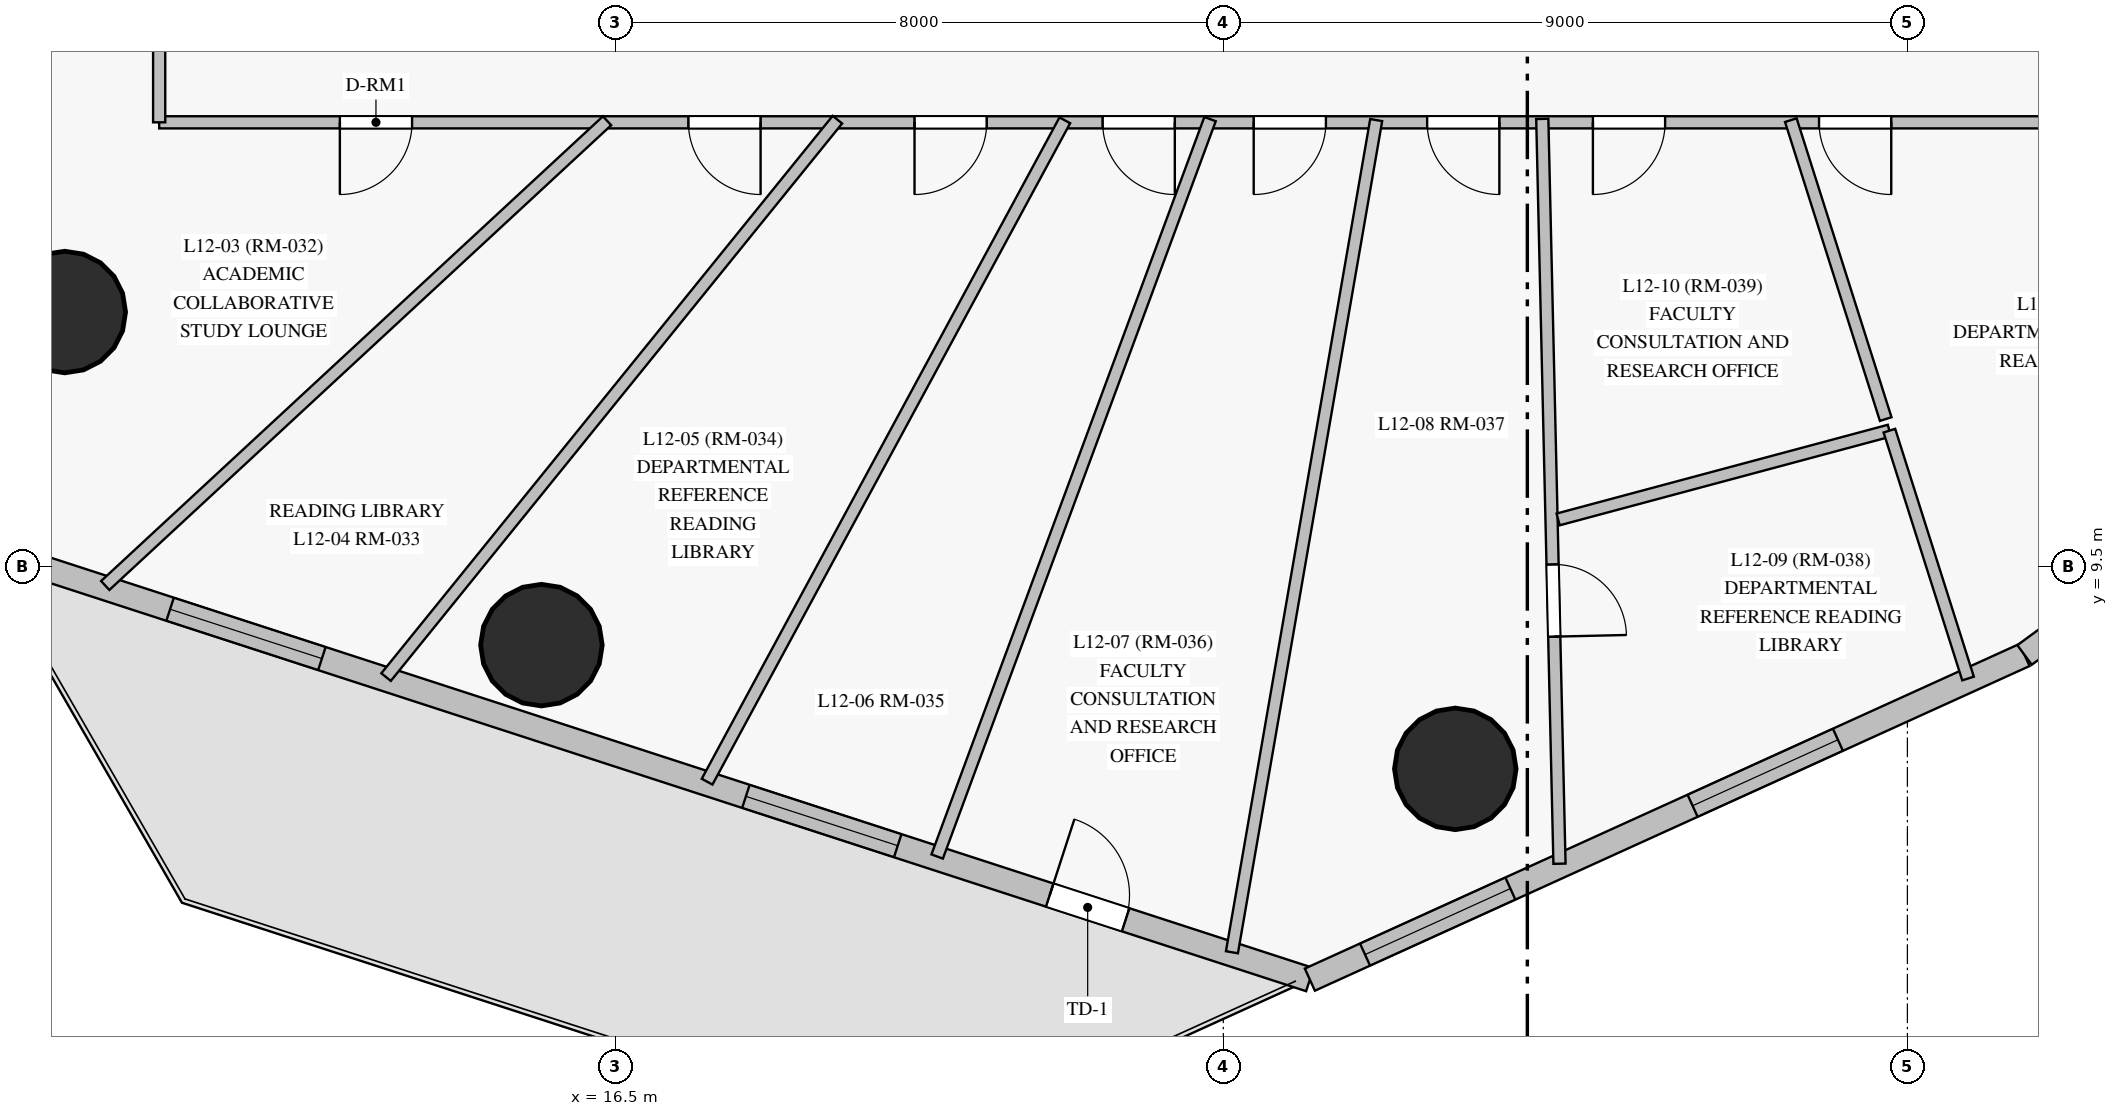
"""IFC4 building model, lengths in metres.
Left out: names, types, materials, properties, quantities, classifications, styles, units other than length and angle.
Written with IfcOpenShell. Run it as: python <this file> out.ifc"""

import sys

from ifc_helpers import new_model, si_unit, direction, frame, frame_2d, origin, origin_with_axes, origin_2d, place, context, subcontext, project, spatial, rectangle, circle, extrude, source, transform, mapped, element, fill, save


model = new_model("IFC4")
c1 = context("Model", 3, precision=1e-05, world=origin(), true_north=direction((0.0, 1.0)))
c2 = subcontext(c1, "Body", "Model", "MODEL_VIEW")
j1 = project(units=[si_unit("LENGTHUNIT", "METRE"), si_unit("PLANEANGLEUNIT", "RADIAN")], contexts=[c1])
p1 = place(None, origin())
s1 = spatial("IfcSite", under=j1, at=p1, CompositionType="ELEMENT")
p2 = place(p1, origin())
s2 = spatial("IfcBuilding", under=s1, at=p2, CompositionType="ELEMENT")
p3 = place(p2, frame((0.0, 0.0, 48.1)))
s3 = spatial("IfcBuildingStorey", under=s2, at=p3, CompositionType="ELEMENT", Elevation=48.1)
m1 = source(origin_with_axes(), c2, "Body", "SweptSolid", [
    extrude(circle(Radius=0.8, at=origin_2d()), origin(), (0.0, 0.0, 1.0), 3.6),
])
for number, where, z_axis, x_axis in (
    (1, (9.258, 12.854, 0.0), (0.0, 0.0, 1.0), (1.0, 0.0, 0.0)),
    (2, (15.529, 8.472, 0.0), (0.0, 0.0, 1.0), (1.0, 0.0, 0.0)),
    (3, (27.552, 6.844, 0.0), (0.0, 0.0, 1.0), (1.0, 0.0, 0.0)),
):
    element("IfcColumn", number, at=place(p3, frame(where, z_axis=z_axis, x_axis=x_axis)), inside=s3, PredefinedType="COLUMN", context=c2, shape_type="MappedRepresentation", body=[
        mapped(m1, transform((0.0, 0.0, 0.0), scale=1.0)),
    ])
p4 = place(p3, frame((8.1, 9.771, 0.0), z_axis=(0.0, 0.0, 1.0), x_axis=(0.951043115776, -0.30905823389, 0.0)))
e4 = element("IfcWall", 4, at=p4, inside=s3, PredefinedType="SOLIDWALL", context=c2, shape_type="SweptSolid", body=[
    extrude(rectangle(XDim=18.442, YDim=0.32, at=frame_2d((9.221, 0.0))), origin(), (0.0, 0.0, 1.0), 3.35),
])
p5 = place(p4, frame((2.675, 0.0, 0.85)))
e5 = element("IfcOpeningElement", 5, at=p5, cuts=e4, PredefinedType="OPENING", context=c2, shape_type="SweptSolid", body=[
    extrude(rectangle(XDim=2.1, YDim=1.95, at=frame_2d((1.05, 0.975))), frame((0.0, 0.17, 0.0), z_axis=(0.0, -1.0, 0.0), x_axis=(1.0, 0.0, 0.0)), (0.0, 0.0, 1.0), 0.34),
])
p6 = place(p4, frame((10.64, 0.0, 0.85)))
e6 = element("IfcOpeningElement", 6, at=p6, cuts=e4, PredefinedType="OPENING", context=c2, shape_type="SweptSolid", body=[
    extrude(rectangle(XDim=2.1, YDim=1.95, at=frame_2d((1.05, 0.975))), frame((0.0, 0.17, 0.0), z_axis=(0.0, -1.0, 0.0), x_axis=(1.0, 0.0, 0.0)), (0.0, 0.0, 1.0), 0.34),
])
p7 = place(p4, frame((14.843, 0.0, 0.0)))
e7 = element("IfcOpeningElement", 7, at=p7, cuts=e4, PredefinedType="OPENING", context=c2, shape_type="SweptSolid", body=[
    extrude(rectangle(XDim=1.05, YDim=2.12, at=frame_2d((0.525, 1.06))), frame((0.0, 0.17, 0.0), z_axis=(0.0, -1.0, 0.0), x_axis=(1.0, 0.0, 0.0)), (0.0, 0.0, 1.0), 0.34),
])
p8 = place(p3, frame((25.639, 4.071, 0.0), z_axis=(0.0, 0.0, 1.0), x_axis=(0.910463604795, 0.413589197567, 0.0)))
e8 = element("IfcWall", 8, at=p8, inside=s3, PredefinedType="SOLIDWALL", context=c2, shape_type="SweptSolid", body=[
    extrude(rectangle(XDim=10.327, YDim=0.32, at=frame_2d((5.164, 0.0))), origin(), (0.0, 0.0, 1.0), 3.35),
])
p9 = place(p8, frame((0.797, 0.0, 0.85)))
e9 = element("IfcOpeningElement", 9, at=p9, cuts=e8, PredefinedType="OPENING", context=c2, shape_type="SweptSolid", body=[
    extrude(rectangle(XDim=2.1, YDim=1.95, at=frame_2d((1.05, 0.975))), frame((0.0, 0.17, 0.0), z_axis=(0.0, -1.0, 0.0), x_axis=(1.0, 0.0, 0.0)), (0.0, 0.0, 1.0), 0.34),
])
p10 = place(p8, frame((5.531, 0.0, 0.85)))
e10 = element("IfcOpeningElement", 10, at=p10, cuts=e8, PredefinedType="OPENING", context=c2, shape_type="SweptSolid", body=[
    extrude(rectangle(XDim=2.1, YDim=1.95, at=frame_2d((1.05, 0.975))), frame((0.0, 0.17, 0.0), z_axis=(0.0, -1.0, 0.0), x_axis=(1.0, 0.0, 0.0)), (0.0, 0.0, 1.0), 0.34),
])
p11 = place(p3, frame((35.042, 8.343, 0.0), z_axis=(0.0, 0.0, 1.0), x_axis=(0.806545755589, 0.591171670618, 0.0)))
e11 = element("IfcWall", 11, at=p11, inside=s3, PredefinedType="SOLIDWALL", context=c2, shape_type="SweptSolid", body=[
    extrude(rectangle(XDim=10.916, YDim=0.32, at=frame_2d((5.458, 0.0))), origin(), (0.0, 0.0, 1.0), 3.35),
])
p12 = place(p11, frame((1.869, 0.0, 0.85)))
e12 = element("IfcOpeningElement", 12, at=p12, cuts=e11, PredefinedType="OPENING", context=c2, shape_type="SweptSolid", body=[
    extrude(rectangle(XDim=2.1, YDim=1.95, at=frame_2d((1.05, 0.975))), frame((0.0, 0.17, 0.0), z_axis=(0.0, -1.0, 0.0), x_axis=(1.0, 0.0, 0.0)), (0.0, 0.0, 1.0), 0.34),
])
p13 = place(p11, frame((6.947, 0.0, 0.85)))
e13 = element("IfcOpeningElement", 13, at=p13, cuts=e11, PredefinedType="OPENING", context=c2, shape_type="SweptSolid", body=[
    extrude(rectangle(XDim=2.1, YDim=1.95, at=frame_2d((1.05, 0.975))), frame((0.0, 0.17, 0.0), z_axis=(0.0, -1.0, 0.0), x_axis=(1.0, 0.0, 0.0)), (0.0, 0.0, 1.0), 0.34),
])
p14 = place(p3, frame((40.25, 15.35, 0.0), z_axis=(0.0, 0.0, 1.0), x_axis=(-1.0, 0.0, 0.0)))
e14 = element("IfcWall", 14, at=p14, inside=s3, PredefinedType="PARTITIONING", context=c2, shape_type="SweptSolid", body=[
    extrude(rectangle(XDim=29.75, YDim=0.16, at=frame_2d((14.875, 0.0))), origin(), (0.0, 0.0, 1.0), 2.7),
])
p15 = place(p14, frame((26.423, 0.0, 0.0)))
e15 = element("IfcOpeningElement", 15, at=p15, cuts=e14, PredefinedType="OPENING", context=c2, shape_type="SweptSolid", body=[
    extrude(rectangle(XDim=0.95, YDim=2.15, at=frame_2d((0.475, 1.075))), frame((0.0, 0.09, 0.0), z_axis=(0.0, -1.0, 0.0), x_axis=(1.0, 0.0, 0.0)), (0.0, 0.0, 1.0), 0.18),
])
p16 = place(p14, frame((21.837, 0.0, 0.0)))
e16 = element("IfcOpeningElement", 16, at=p16, cuts=e14, PredefinedType="OPENING", context=c2, shape_type="SweptSolid", body=[
    extrude(rectangle(XDim=0.95, YDim=2.15, at=frame_2d((0.475, 1.075))), frame((0.0, 0.09, 0.0), z_axis=(0.0, -1.0, 0.0), x_axis=(1.0, 0.0, 0.0)), (0.0, 0.0, 1.0), 0.18),
])
p17 = place(p14, frame((18.863, 0.0, 0.0)))
e17 = element("IfcOpeningElement", 17, at=p17, cuts=e14, PredefinedType="OPENING", context=c2, shape_type="SweptSolid", body=[
    extrude(rectangle(XDim=0.95, YDim=2.15, at=frame_2d((0.475, 1.075))), frame((0.0, 0.09, 0.0), z_axis=(0.0, -1.0, 0.0), x_axis=(1.0, 0.0, 0.0)), (0.0, 0.0, 1.0), 0.18),
])
p18 = place(p14, frame((16.388, 0.0, 0.0)))
e18 = element("IfcOpeningElement", 18, at=p18, cuts=e14, PredefinedType="OPENING", context=c2, shape_type="SweptSolid", body=[
    extrude(rectangle(XDim=0.95, YDim=2.15, at=frame_2d((0.475, 1.075))), frame((0.0, 0.09, 0.0), z_axis=(0.0, -1.0, 0.0), x_axis=(1.0, 0.0, 0.0)), (0.0, 0.0, 1.0), 0.18),
])
p19 = place(p14, frame((14.4, 0.0, 0.0)))
e19 = element("IfcOpeningElement", 19, at=p19, cuts=e14, PredefinedType="OPENING", context=c2, shape_type="SweptSolid", body=[
    extrude(rectangle(XDim=0.95, YDim=2.15, at=frame_2d((0.475, 1.075))), frame((0.0, 0.09, 0.0), z_axis=(0.0, -1.0, 0.0), x_axis=(1.0, 0.0, 0.0)), (0.0, 0.0, 1.0), 0.18),
])
p20 = place(p14, frame((12.118, 0.0, 0.0)))
e20 = element("IfcOpeningElement", 20, at=p20, cuts=e14, PredefinedType="OPENING", context=c2, shape_type="SweptSolid", body=[
    extrude(rectangle(XDim=0.95, YDim=2.15, at=frame_2d((0.475, 1.075))), frame((0.0, 0.09, 0.0), z_axis=(0.0, -1.0, 0.0), x_axis=(1.0, 0.0, 0.0)), (0.0, 0.0, 1.0), 0.18),
])
p21 = place(p14, frame((9.938, 0.0, 0.0)))
e21 = element("IfcOpeningElement", 21, at=p21, cuts=e14, PredefinedType="OPENING", context=c2, shape_type="SweptSolid", body=[
    extrude(rectangle(XDim=0.95, YDim=2.15, at=frame_2d((0.475, 1.075))), frame((0.0, 0.09, 0.0), z_axis=(0.0, -1.0, 0.0), x_axis=(1.0, 0.0, 0.0)), (0.0, 0.0, 1.0), 0.18),
])
p22 = place(p14, frame((6.962, 0.0, 0.0)))
e22 = element("IfcOpeningElement", 22, at=p22, cuts=e14, PredefinedType="OPENING", context=c2, shape_type="SweptSolid", body=[
    extrude(rectangle(XDim=0.95, YDim=2.15, at=frame_2d((0.475, 1.075))), frame((0.0, 0.09, 0.0), z_axis=(0.0, -1.0, 0.0), x_axis=(1.0, 0.0, 0.0)), (0.0, 0.0, 1.0), 0.18),
])
p23 = place(p3, frame((10.5, 15.35, 0.0), z_axis=(0.0, 0.0, 1.0), x_axis=(0.0, 1.0, 0.0)))
e23 = element("IfcWall", 23, at=p23, inside=s3, PredefinedType="PARTITIONING", context=c2, shape_type="SweptSolid", body=[
    extrude(rectangle(XDim=22.3, YDim=0.16, at=frame_2d((11.15, 0.0))), origin(), (0.0, 0.0, 1.0), 2.75),
])
p24 = place(p23, frame((7.33, 0.0, 0.0)))
e24 = element("IfcOpeningElement", 24, at=p24, cuts=e23, PredefinedType="OPENING", context=c2, shape_type="SweptSolid", body=[
    extrude(rectangle(XDim=0.95, YDim=2.15, at=frame_2d((0.475, 1.075))), frame((0.0, 0.09, 0.0), z_axis=(0.0, -1.0, 0.0), x_axis=(1.0, 0.0, 0.0)), (0.0, 0.0, 1.0), 0.18),
])
p25 = place(p23, frame((2.893, 0.0, 0.0)))
e25 = element("IfcOpeningElement", 25, at=p25, cuts=e23, PredefinedType="OPENING", context=c2, shape_type="SweptSolid", body=[
    extrude(rectangle(XDim=0.96, YDim=2.15, at=frame_2d((0.48, 1.075))), frame((0.0, 0.09, 0.0), z_axis=(0.0, -1.0, 0.0), x_axis=(1.0, 0.0, 0.0)), (0.0, 0.0, 1.0), 0.18),
])
p26 = place(p23, frame((16.25, 0.0, 0.0)))
e26 = element("IfcOpeningElement", 26, at=p26, cuts=e23, PredefinedType="OPENING", context=c2, shape_type="SweptSolid", body=[
    extrude(rectangle(XDim=0.95, YDim=2.15, at=frame_2d((0.475, 1.075))), frame((0.0, 0.09, 0.0), z_axis=(0.0, -1.0, 0.0), x_axis=(1.0, 0.0, 0.0)), (0.0, 0.0, 1.0), 0.18),
])
p27 = place(p23, frame((11.165, 0.0, 0.0)))
e27 = element("IfcOpeningElement", 27, at=p27, cuts=e23, PredefinedType="OPENING", context=c2, shape_type="SweptSolid", body=[
    extrude(rectangle(XDim=0.95, YDim=2.15, at=frame_2d((0.475, 1.075))), frame((0.0, 0.09, 0.0), z_axis=(0.0, -1.0, 0.0), x_axis=(1.0, 0.0, 0.0)), (0.0, 0.0, 1.0), 0.18),
])
p28 = place(p3, frame((26.511, 15.38, 0.0), z_axis=(0.0, 0.0, 1.0), x_axis=(-0.170808907671, -0.985304174892, 0.0)))
e28 = element("IfcWall", 28, at=p28, inside=s3, PredefinedType="PARTITIONING", context=c2, shape_type="SweptSolid", body=[
    extrude(rectangle(XDim=11.112, YDim=0.16, at=frame_2d((5.556, 0.0))), origin(), (0.0, 0.0, 1.0), 2.7),
])
p29 = place(p3, frame((24.325, 15.392, 0.0), z_axis=(0.0, 0.0, 1.0), x_axis=(-0.347043758282, -0.937848937643, 0.0)))
e29 = element("IfcWall", 29, at=p29, inside=s3, PredefinedType="PARTITIONING", context=c2, shape_type="SweptSolid", body=[
    extrude(rectangle(XDim=10.344, YDim=0.16, at=frame_2d((5.172, 0.0))), origin(), (0.0, 0.0, 1.0), 3.35),
])
p30 = place(p3, frame((22.415, 15.376, 0.0), z_axis=(0.0, 0.0, 1.0), x_axis=(-0.475769444139, -0.879570029062, 0.0)))
e30 = element("IfcWall", 30, at=p30, inside=s3, PredefinedType="PARTITIONING", context=c2, shape_type="SweptSolid", body=[
    extrude(rectangle(XDim=9.892, YDim=0.16, at=frame_2d((4.946, 0.0))), origin(), (0.0, 0.0, 1.0), 3.35),
])
p31 = place(p3, frame((28.697, 15.395, 0.0), z_axis=(0.0, 0.0, 1.0), x_axis=(0.023090314087, -0.999733383155, 0.0)))
e31 = element("IfcWall", 31, at=p31, inside=s3, PredefinedType="PARTITIONING", context=c2, shape_type="SweptSolid", body=[
    extrude(rectangle(XDim=9.802, YDim=0.16, at=frame_2d((4.901, 0.0))), origin(), (0.0, 0.0, 1.0), 3.35),
])
p32 = place(p31, frame((5.863, 0.0, 0.0)))
e32 = element("IfcOpeningElement", 32, at=p32, cuts=e31, PredefinedType="OPENING", context=c2, shape_type="SweptSolid", body=[
    extrude(rectangle(XDim=0.95, YDim=2.15, at=frame_2d((0.475, 1.075))), frame((0.0, 0.09, 0.0), z_axis=(0.0, -1.0, 0.0), x_axis=(1.0, 0.0, 0.0)), (0.0, 0.0, 1.0), 0.18),
])
p33 = place(p3, frame((19.423, 15.385, 0.0), z_axis=(0.0, 0.0, 1.0), x_axis=(-0.629284562833, -0.777174973208, 0.0)))
e33 = element("IfcWall", 33, at=p33, inside=s3, PredefinedType="PARTITIONING", context=c2, shape_type="SweptSolid", body=[
    extrude(rectangle(XDim=9.436, YDim=0.16, at=frame_2d((4.718, 0.0))), origin(), (0.0, 0.0, 1.0), 2.7),
])
p34 = place(p3, frame((16.393, 15.37, 0.0), z_axis=(0.0, 0.0, 1.0), x_axis=(-0.733730115862, -0.679441032818, 0.0)))
e34 = element("IfcWall", 34, at=p34, inside=s3, PredefinedType="PARTITIONING", context=c2, shape_type="SweptSolid", body=[
    extrude(rectangle(XDim=8.999, YDim=0.16, at=frame_2d((4.499, 0.0))), origin(), (0.0, 0.0, 1.0), 3.35),
])
p35 = place(p3, frame((10.527, 17.409, 0.0), z_axis=(0.0, 0.0, 1.0), x_axis=(-0.89100695579, -0.453989652673, 0.0)))
e35 = element("IfcWall", 35, at=p35, inside=s3, PredefinedType="PARTITIONING", context=c2, shape_type="SweptSolid", body=[
    extrude(rectangle(XDim=5.898, YDim=0.16, at=frame_2d((2.949, 0.0))), origin(), (0.0, 0.0, 1.0), 3.35),
])
p36 = place(p3, frame((28.905, 10.126, 0.0), z_axis=(0.0, 0.0, 1.0), x_axis=(0.965928004667, 0.258810915149, 0.0)))
e36 = element("IfcWall", 36, at=p36, inside=s3, PredefinedType="PARTITIONING", context=c2, shape_type="SweptSolid", body=[
    extrude(rectangle(XDim=4.512, YDim=0.16, at=frame_2d((2.256, 0.0))), origin(), (0.0, 0.0, 1.0), 2.75),
])
p37 = place(p3, frame((31.967, 15.379, 0.0), z_axis=(0.0, 0.0, 1.0), x_axis=(0.302490392513, -0.953152433999, 0.0)))
e37 = element("IfcWall", 37, at=p37, inside=s3, PredefinedType="PARTITIONING", context=c2, shape_type="SweptSolid", body=[
    extrude(rectangle(XDim=4.126, YDim=0.16, at=frame_2d((2.063, 0.0))), origin(), (0.0, 0.0, 1.0), 3.35),
])
p38 = place(p3, frame((33.263, 11.293, 0.0), z_axis=(0.0, 0.0, 1.0), x_axis=(0.302449465178, -0.953165421642, 0.0)))
e38 = element("IfcWall", 38, at=p38, inside=s3, PredefinedType="PARTITIONING", context=c2, shape_type="SweptSolid", body=[
    extrude(rectangle(XDim=3.421, YDim=0.16, at=frame_2d((1.71, 0.0))), origin(), (0.0, 0.0, 1.0), 3.35),
])
m2 = source(origin_with_axes(), c2, "Body", "SweptSolid", [
    extrude(rectangle(XDim=2.1, YDim=1.95, at=frame_2d((1.05, 0.975))), frame((0.0, 0.03, 0.0), z_axis=(0.0, -1.0, 0.0), x_axis=(1.0, 0.0, 0.0)), (0.0, 0.0, 1.0), 0.06),
])
p39 = place(p5, origin())
e39 = element("IfcWindow", 39, at=p39, inside=s3, PartitioningType="SINGLE_PANEL", PredefinedType="WINDOW", context=c2, shape_type="MappedRepresentation", body=[
    mapped(m2, transform((0.0, 0.0, 0.0), scale=1.0)),
])
fill(e5, e39)
p40 = place(p6, origin())
e40 = element("IfcWindow", 40, at=p40, inside=s3, PartitioningType="SINGLE_PANEL", PredefinedType="WINDOW", context=c2, shape_type="MappedRepresentation", body=[
    mapped(m2, transform((0.0, 0.0, 0.0), scale=1.0)),
])
fill(e6, e40)
p41 = place(p9, origin())
e41 = element("IfcWindow", 41, at=p41, inside=s3, PartitioningType="SINGLE_PANEL", PredefinedType="WINDOW", context=c2, shape_type="MappedRepresentation", body=[
    mapped(m2, transform((0.0, 0.0, 0.0), scale=1.0)),
])
fill(e9, e41)
p42 = place(p10, origin())
e42 = element("IfcWindow", 42, at=p42, inside=s3, PartitioningType="SINGLE_PANEL", PredefinedType="WINDOW", context=c2, shape_type="MappedRepresentation", body=[
    mapped(m2, transform((0.0, 0.0, 0.0), scale=1.0)),
])
fill(e10, e42)
m3 = source(origin_with_axes(), c2, "Body", "SweptSolid", [
    extrude(rectangle(XDim=1.05, YDim=2.12, at=frame_2d((0.525, 1.06))), frame((0.0, 0.025, 0.0), z_axis=(0.0, -1.0, 0.0), x_axis=(1.0, 0.0, 0.0)), (0.0, 0.0, 1.0), 0.05),
])
p43 = place(p7, origin())
e43 = element("IfcDoor", 43, at=p43, inside=s3, OperationType="SINGLE_SWING_LEFT", PredefinedType="DOOR", context=c2, shape_type="MappedRepresentation", body=[
    mapped(m3, transform((0.0, 0.0, 0.0), scale=1.0)),
])
fill(e7, e43)
m4 = source(origin_with_axes(), c2, "Body", "SweptSolid", [
    extrude(rectangle(XDim=0.95, YDim=2.15, at=frame_2d((0.475, 1.075))), frame((0.0, 0.025, 0.0), z_axis=(0.0, -1.0, 0.0), x_axis=(1.0, 0.0, 0.0)), (0.0, 0.0, 1.0), 0.05),
])
p44 = place(p15, origin())
e44 = element("IfcDoor", 44, at=p44, inside=s3, OperationType="SINGLE_SWING_RIGHT", PredefinedType="DOOR", context=c2, shape_type="MappedRepresentation", body=[
    mapped(m4, transform((0.0, 0.0, 0.0), scale=1.0)),
])
fill(e15, e44)
p45 = place(p16, origin())
e45 = element("IfcDoor", 45, at=p45, inside=s3, OperationType="SINGLE_SWING_LEFT", PredefinedType="DOOR", context=c2, shape_type="MappedRepresentation", body=[
    mapped(m4, transform((0.0, 0.0, 0.0), scale=1.0)),
])
fill(e16, e45)
p46 = place(p17, origin())
e46 = element("IfcDoor", 46, at=p46, inside=s3, OperationType="SINGLE_SWING_RIGHT", PredefinedType="DOOR", context=c2, shape_type="MappedRepresentation", body=[
    mapped(m4, transform((0.0, 0.0, 0.0), scale=1.0)),
])
fill(e17, e46)
p47 = place(p18, origin())
e47 = element("IfcDoor", 47, at=p47, inside=s3, OperationType="SINGLE_SWING_LEFT", PredefinedType="DOOR", context=c2, shape_type="MappedRepresentation", body=[
    mapped(m4, transform((0.0, 0.0, 0.0), scale=1.0)),
])
fill(e18, e47)
p48 = place(p19, origin())
e48 = element("IfcDoor", 48, at=p48, inside=s3, OperationType="SINGLE_SWING_RIGHT", PredefinedType="DOOR", context=c2, shape_type="MappedRepresentation", body=[
    mapped(m4, transform((0.0, 0.0, 0.0), scale=1.0)),
])
fill(e19, e48)
p49 = place(p20, origin())
e49 = element("IfcDoor", 49, at=p49, inside=s3, OperationType="SINGLE_SWING_LEFT", PredefinedType="DOOR", context=c2, shape_type="MappedRepresentation", body=[
    mapped(m4, transform((0.0, 0.0, 0.0), scale=1.0)),
])
fill(e20, e49)
p50 = place(p21, origin())
e50 = element("IfcDoor", 50, at=p50, inside=s3, OperationType="SINGLE_SWING_RIGHT", PredefinedType="DOOR", context=c2, shape_type="MappedRepresentation", body=[
    mapped(m4, transform((0.0, 0.0, 0.0), scale=1.0)),
])
fill(e21, e50)
p51 = place(p22, origin())
e51 = element("IfcDoor", 51, at=p51, inside=s3, OperationType="SINGLE_SWING_LEFT", PredefinedType="DOOR", context=c2, shape_type="MappedRepresentation", body=[
    mapped(m4, transform((0.0, 0.0, 0.0), scale=1.0)),
])
fill(e22, e51)
p52 = place(p32, origin())
e52 = element("IfcDoor", 52, at=p52, inside=s3, OperationType="SINGLE_SWING_RIGHT", PredefinedType="DOOR", context=c2, shape_type="MappedRepresentation", body=[
    mapped(m4, transform((0.0, 0.0, 0.0), scale=1.0)),
])
fill(e32, e52)
save(model, sys.argv[1])
